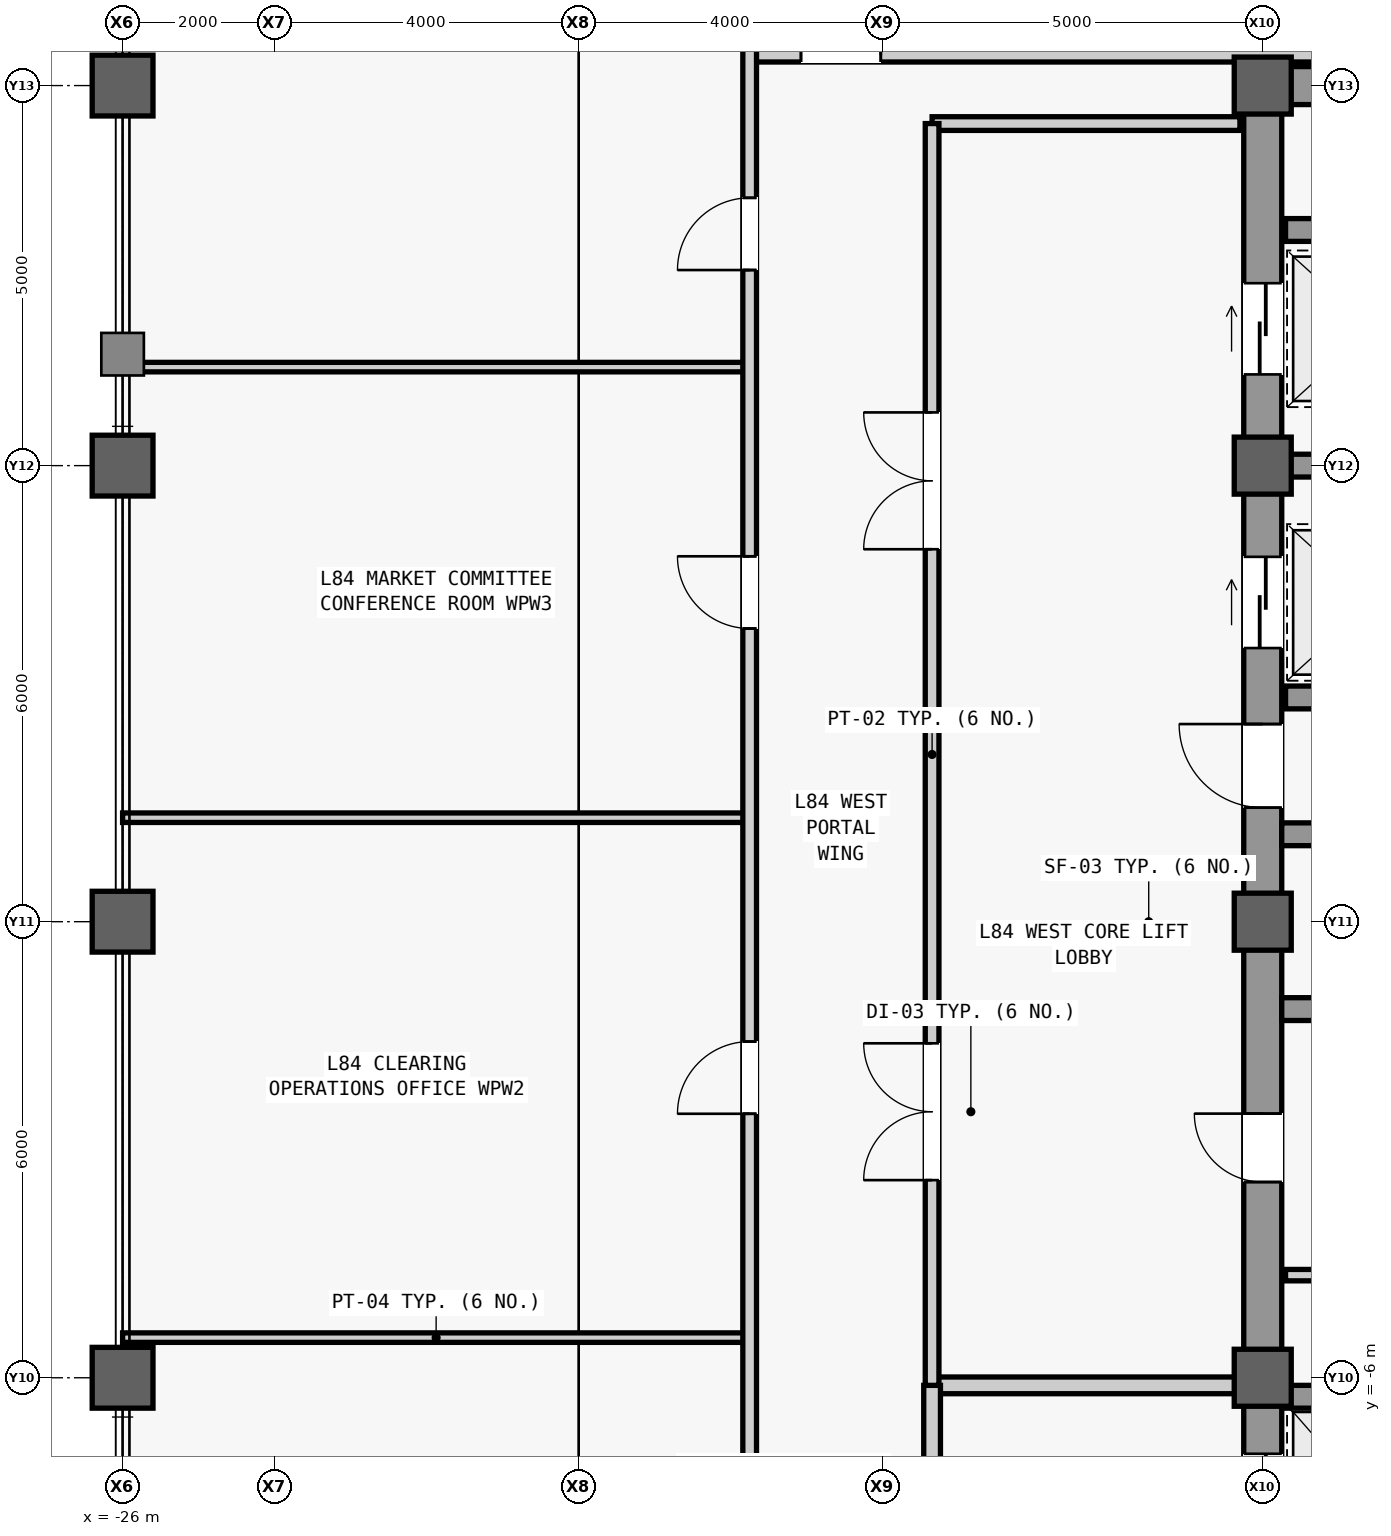
"""IFC4 building model, lengths in metres.
Left out: names, types, materials, properties, quantities, classifications, styles, units other than length and angle.
Written with IfcOpenShell. Run it as: python <this file> out.ifc"""

import sys

from ifc_helpers import new_model, si_unit, direction, frame, frame_2d, origin, origin_2d, place, context, subcontext, project, spatial, rectangle, hollow_rectangle, extrude, source, transform, mapped, element, fill, save


model = new_model("IFC4")
c1 = context("Model", 3, precision=1e-05, world=origin(), true_north=direction((0.0, 1.0)))
c2 = subcontext(c1, "Body", "Model", "MODEL_VIEW")
j1 = project(units=[si_unit("LENGTHUNIT", "METRE"), si_unit("PLANEANGLEUNIT", "RADIAN")], contexts=[c1])
p1 = place(None, origin())
s1 = spatial("IfcSite", under=j1, at=p1, CompositionType="ELEMENT")
p2 = place(p1, origin())
s2 = spatial("IfcBuilding", under=s1, at=p2, CompositionType="ELEMENT")
p3 = place(p2, frame((0.0, 0.0, 354.3)))
s3 = spatial("IfcBuildingStorey", under=s2, at=p3, CompositionType="ELEMENT", Elevation=354.3)
m1 = source(origin(), c2, "Body", "SweptSolid", [
    extrude(rectangle(XDim=22.0, YDim=0.5, at=frame_2d((11.0, 0.0))), origin(), (0.0, 0.0, 1.0), 3.74),
])
p4 = place(p3, frame((-11.0, -11.0, 0.0), z_axis=(0.0, 0.0, 1.0), x_axis=(0.0, 1.0, 0.0)))
e1 = element("IfcWall", 1, at=p4, inside=s3, PredefinedType="SHEAR", context=c2, shape_type="MappedRepresentation", body=[
    mapped(m1, transform((0.0, 0.0, 0.0), scale=1.0)),
])
m2 = source(origin(), c2, "Body", "SweptSolid", [
    extrude(rectangle(XDim=1.1, YDim=2.2, at=frame_2d((0.55, 1.1))), frame((0.0, 0.26, 0.0), z_axis=(0.0, -1.0, 0.0), x_axis=(1.0, 0.0, 0.0)), (0.0, 0.0, 1.0), 0.52),
])
p5 = place(p4, frame((0.8, 0.0, 0.0)))
e2 = element("IfcOpeningElement", 2, at=p5, cuts=e1, PredefinedType="OPENING", context=c2, shape_type="MappedRepresentation", body=[
    mapped(m2, transform((0.0, 0.0, 0.0), scale=1.0)),
])
p6 = place(p4, frame((12.5, 0.0, 0.0)))
e3 = element("IfcOpeningElement", 3, at=p6, cuts=e1, PredefinedType="OPENING", context=c2, shape_type="MappedRepresentation", body=[
    mapped(m2, transform((0.0, 0.0, 0.0), scale=1.0)),
])
m3 = source(origin(), c2, "Body", "SweptSolid", [
    extrude(rectangle(XDim=0.9, YDim=2.15, at=frame_2d((0.45, 1.075))), frame((0.0, 0.26, 0.0), z_axis=(0.0, -1.0, 0.0), x_axis=(1.0, 0.0, 0.0)), (0.0, 0.0, 1.0), 0.52),
])
p7 = place(p4, frame((7.575, 0.0, 0.0)))
e4 = element("IfcOpeningElement", 4, at=p7, cuts=e1, PredefinedType="OPENING", context=c2, shape_type="MappedRepresentation", body=[
    mapped(m3, transform((0.0, 0.0, 0.0), scale=1.0)),
])
m4 = source(origin(), c2, "Body", "SweptSolid", [
    extrude(rectangle(XDim=1.2, YDim=2.3, at=frame_2d((0.6, 1.15))), frame((0.0, 0.26, 0.0), z_axis=(0.0, -1.0, 0.0), x_axis=(1.0, 0.0, 0.0)), (0.0, 0.0, 1.0), 0.52),
])
p8 = place(p4, frame((14.6, 0.0, 0.0)))
e5 = element("IfcOpeningElement", 5, at=p8, cuts=e1, PredefinedType="OPENING", context=c2, shape_type="MappedRepresentation", body=[
    mapped(m4, transform((0.0, 0.0, 0.0), scale=1.0)),
])
p9 = place(p4, frame((18.2, 0.0, 0.0)))
e6 = element("IfcOpeningElement", 6, at=p9, cuts=e1, PredefinedType="OPENING", context=c2, shape_type="MappedRepresentation", body=[
    mapped(m4, transform((0.0, 0.0, 0.0), scale=1.0)),
])
m5 = source(origin(), c2, "Body", "SweptSolid", [
    extrude(rectangle(XDim=1.3, YDim=2.3, at=frame_2d((0.65, 1.15))), frame((0.0, 0.26, 0.0), z_axis=(0.0, -1.0, 0.0), x_axis=(1.0, 0.0, 0.0)), (0.0, 0.0, 1.0), 0.52),
])
p10 = place(p4, frame((2.7, 0.0, 0.0)))
e7 = element("IfcOpeningElement", 7, at=p10, cuts=e1, PredefinedType="OPENING", context=c2, shape_type="MappedRepresentation", body=[
    mapped(m5, transform((0.0, 0.0, 0.0), scale=1.0)),
])
m6 = source(origin(), c2, "Body", "SweptSolid", [
    extrude(rectangle(XDim=5.9, YDim=0.5, at=frame_2d((2.95, 0.0))), origin(), (0.0, 0.0, 1.0), 3.74),
])
p11 = place(p3, frame((-10.75, 11.0, 0.0), z_axis=(0.0, 0.0, 1.0), x_axis=(1.0, 0.0, 0.0)))
e8 = element("IfcWall", 8, at=p11, inside=s3, PredefinedType="SHEAR", context=c2, shape_type="MappedRepresentation", body=[
    mapped(m6, transform((0.0, 0.0, 0.0), scale=1.0)),
])
m7 = source(origin(), c2, "Body", "SweptSolid", [
    extrude(rectangle(XDim=5.65, YDim=0.3, at=frame_2d((2.825, 0.0))), origin(), (0.0, 0.0, 1.0), 3.74),
])
for number, where, z_axis, x_axis in (
    (9, (-10.75, -1.15, 0.0), (0.0, 0.0, 1.0), (1.0, 0.0, 0.0)),
    (10, (-10.75, 1.15, 0.0), (0.0, 0.0, 1.0), (1.0, 0.0, 0.0)),
):
    element("IfcWall", number, at=place(p3, frame(where, z_axis=z_axis, x_axis=x_axis)), inside=s3, PredefinedType="SHEAR", context=c2, shape_type="MappedRepresentation", body=[
        mapped(m7, transform((0.0, 0.0, 0.0), scale=1.0)),
    ])
m8 = source(origin(), c2, "Body", "SweptSolid", [
    extrude(hollow_rectangle(XDim=0.8, YDim=0.8, WallThickness=0.045, at=origin_2d()), origin(), (0.0, 0.0, 1.0), 4.0),
])
for number, where, z_axis, x_axis in (
    (11, (-26.0, -6.0, 0.0), (0.0, 0.0, 1.0), (1.0, 0.0, 0.0)),
    (12, (-26.0, 0.0, 0.0), (0.0, 0.0, 1.0), (1.0, 0.0, 0.0)),
    (13, (-26.0, 6.0, 0.0), (0.0, 0.0, 1.0), (1.0, 0.0, 0.0)),
    (14, (-26.0, 11.0, 0.0), (0.0, 0.0, 1.0), (1.0, 0.0, 0.0)),
):
    element("IfcColumn", number, at=place(p3, frame(where, z_axis=z_axis, x_axis=x_axis)), inside=s3, PredefinedType="COLUMN", context=c2, shape_type="MappedRepresentation", body=[
        mapped(m8, transform((0.0, 0.0, 0.0), scale=1.0)),
    ])
m9 = source(origin(), c2, "Body", "SweptSolid", [
    extrude(rectangle(XDim=0.75, YDim=0.75, at=origin_2d()), origin(), (0.0, 0.0, 1.0), 4.0),
])
for number, where, z_axis, x_axis in (
    (15, (-11.0, -6.0, 0.0), (0.0, 0.0, 1.0), (1.0, 0.0, 0.0)),
    (16, (-11.0, 0.0, 0.0), (0.0, 0.0, 1.0), (1.0, 0.0, 0.0)),
    (17, (-11.0, 6.0, 0.0), (0.0, 0.0, 1.0), (1.0, 0.0, 0.0)),
    (18, (-11.0, 11.0, 0.0), (0.0, 0.0, 1.0), (1.0, 0.0, 0.0)),
):
    element("IfcColumn", number, at=place(p3, frame(where, z_axis=z_axis, x_axis=x_axis)), inside=s3, PredefinedType="COLUMN", context=c2, shape_type="MappedRepresentation", body=[
        mapped(m9, transform((0.0, 0.0, 0.0), scale=1.0)),
    ])
m10 = source(origin(), c2, "Body", "SweptSolid", [
    extrude(rectangle(XDim=2.2, YDim=0.3, at=frame_2d((1.1, 0.0))), origin(), (0.0, 0.0, 1.0), 3.74),
])
for number, where, z_axis, x_axis in (
    (19, (-10.7, -6.25, 0.0), (0.0, 0.0, 1.0), (1.0, 0.0, 0.0)),
    (20, (-10.7, 2.95, 0.0), (0.0, 0.0, 1.0), (1.0, 0.0, 0.0)),
    (21, (-10.7, 6.0, 0.0), (0.0, 0.0, 1.0), (1.0, 0.0, 0.0)),
    (22, (-10.7, 9.1, 0.0), (0.0, 0.0, 1.0), (1.0, 0.0, 0.0)),
):
    element("IfcWall", number, at=place(p3, frame(where, z_axis=z_axis, x_axis=x_axis)), inside=s3, PredefinedType="SHEAR", context=c2, shape_type="MappedRepresentation", body=[
        mapped(m10, transform((0.0, 0.0, 0.0), scale=1.0)),
    ])
m11 = source(origin(), c2, "Body", "SweptSolid", [
    extrude(rectangle(XDim=2.05, YDim=0.15, at=frame_2d((1.025, 0.0))), origin(), (0.0, 0.0, 1.0), 3.74),
])
p12 = place(p3, frame((-10.7, -4.65, 0.0), z_axis=(0.0, 0.0, 1.0), x_axis=(1.0, 0.0, 0.0)))
e23 = element("IfcWall", 23, at=p12, inside=s3, PredefinedType="PARTITIONING", context=c2, shape_type="MappedRepresentation", body=[
    mapped(m11, transform((0.0, 0.0, 0.0), scale=1.0)),
])
m12 = source(origin(), c2, "Body", "SweptSolid", [
    extrude(rectangle(XDim=4.05, YDim=0.22, at=frame_2d((2.025, 0.0))), origin(), (0.0, 0.0, 1.0), 3.124),
])
p13 = place(p3, frame((-15.35, -6.1, 0.0), z_axis=(0.0, 0.0, 1.0), x_axis=(1.0, 0.0, 0.0)))
e24 = element("IfcWall", 24, at=p13, inside=s3, PredefinedType="PARTITIONING", context=c2, shape_type="MappedRepresentation", body=[
    mapped(m12, transform((0.0, 0.0, 0.0), scale=1.0)),
])
m13 = source(origin(), c2, "Body", "SweptSolid", [
    extrude(rectangle(XDim=4.4, YDim=0.22, at=frame_2d((2.2, 0.0))), origin(), (0.0, 0.0, 1.0), 3.74),
])
p14 = place(p3, frame((-15.35, -10.5, 0.0), z_axis=(0.0, 0.0, 1.0), x_axis=(0.0, 1.0, 0.0)))
e25 = element("IfcWall", 25, at=p14, inside=s3, PredefinedType="PARTITIONING", context=c2, shape_type="MappedRepresentation", body=[
    mapped(m13, transform((0.0, 0.0, 0.0), scale=1.0)),
])
m14 = source(origin(), c2, "Body", "SweptSolid", [
    extrude(rectangle(XDim=1.2, YDim=2.2, at=frame_2d((0.6, 1.1))), frame((0.0, 0.12, 0.0), z_axis=(0.0, -1.0, 0.0), x_axis=(1.0, 0.0, 0.0)), (0.0, 0.0, 1.0), 0.24),
])
p15 = place(p14, frame((1.6, 0.0, 0.0)))
e26 = element("IfcOpeningElement", 26, at=p15, cuts=e25, PredefinedType="OPENING", context=c2, shape_type="MappedRepresentation", body=[
    mapped(m14, transform((0.0, 0.0, 0.0), scale=1.0)),
])
m15 = source(origin(), c2, "Body", "SweptSolid", [
    extrude(rectangle(XDim=4.05, YDim=0.18, at=frame_2d((2.025, 0.0))), origin(), (0.0, 0.0, 1.0), 3.74),
])
p16 = place(p3, frame((-15.35, 10.5, 0.0), z_axis=(0.0, 0.0, 1.0), x_axis=(1.0, 0.0, 0.0)))
e27 = element("IfcWall", 27, at=p16, inside=s3, PredefinedType="PARTITIONING", context=c2, shape_type="MappedRepresentation", body=[
    mapped(m15, transform((0.0, 0.0, 0.0), scale=1.0)),
])
m16 = source(origin(), c2, "Body", "SweptSolid", [
    extrude(rectangle(XDim=16.6, YDim=0.18, at=frame_2d((8.3, 0.0))), origin(), (0.0, 0.0, 1.0), 3.74),
])
p17 = place(p3, frame((-15.35, -6.1, 0.0), z_axis=(0.0, 0.0, 1.0), x_axis=(0.0, 1.0, 0.0)))
e28 = element("IfcWall", 28, at=p17, inside=s3, PredefinedType="PARTITIONING", context=c2, shape_type="MappedRepresentation", body=[
    mapped(m16, transform((0.0, 0.0, 0.0), scale=1.0)),
])
m17 = source(origin(), c2, "Body", "SweptSolid", [
    extrude(rectangle(XDim=1.8, YDim=2.25, at=frame_2d((0.9, 1.125))), frame((0.0, 0.1, 0.0), z_axis=(0.0, -1.0, 0.0), x_axis=(1.0, 0.0, 0.0)), (0.0, 0.0, 1.0), 0.2),
])
p18 = place(p17, frame((2.7, 0.0, 0.0)))
e29 = element("IfcOpeningElement", 29, at=p18, cuts=e28, PredefinedType="OPENING", context=c2, shape_type="MappedRepresentation", body=[
    mapped(m17, transform((0.0, 0.0, 0.0), scale=1.0)),
])
p19 = place(p17, frame((11.0, 0.0, 0.0)))
e30 = element("IfcOpeningElement", 30, at=p19, cuts=e28, PredefinedType="OPENING", context=c2, shape_type="MappedRepresentation", body=[
    mapped(m17, transform((0.0, 0.0, 0.0), scale=1.0)),
])
m18 = source(origin(), c2, "Body", "SweptSolid", [
    extrude(rectangle(XDim=12.7, YDim=0.18, at=frame_2d((6.35, 0.0))), origin(), (0.0, 0.0, 1.0), 2.79),
])
p20 = place(p3, frame((-17.75, 11.4, 0.0), z_axis=(0.0, 0.0, 1.0), x_axis=(1.0, 0.0, 0.0)))
e31 = element("IfcWall", 31, at=p20, inside=s3, PredefinedType="PARTITIONING", context=c2, shape_type="MappedRepresentation", body=[
    mapped(m18, transform((0.0, 0.0, 0.0), scale=1.0)),
])
m19 = source(origin(), c2, "Body", "SweptSolid", [
    extrude(rectangle(XDim=1.05, YDim=2.2, at=frame_2d((0.525, 1.1))), frame((0.0, 0.1, 0.0), z_axis=(0.0, -1.0, 0.0), x_axis=(1.0, 0.0, 0.0)), (0.0, 0.0, 1.0), 0.2),
])
p21 = place(p20, frame((0.675, 0.0, 0.0)))
e32 = element("IfcOpeningElement", 32, at=p21, cuts=e31, PredefinedType="OPENING", context=c2, shape_type="MappedRepresentation", body=[
    mapped(m19, transform((0.0, 0.0, 0.0), scale=1.0)),
])
m20 = source(origin(), c2, "Body", "SweptSolid", [
    extrude(rectangle(XDim=8.25, YDim=0.125, at=frame_2d((4.125, 0.0))), origin(), (0.0, 0.0, 1.0), 3.74),
])
for number, where, z_axis, x_axis in (
    (33, (-26.0, -5.472, 0.0), (0.0, 0.0, 1.0), (1.0, 0.0, 0.0)),
    (34, (-26.0, 1.368, 0.0), (0.0, 0.0, 1.0), (1.0, 0.0, 0.0)),
    (35, (-26.0, 7.296, 0.0), (0.0, 0.0, 1.0), (1.0, 0.0, 0.0)),
):
    element("IfcWall", number, at=place(p3, frame(where, z_axis=z_axis, x_axis=x_axis)), inside=s3, PredefinedType="PARTITIONING", context=c2, shape_type="MappedRepresentation", body=[
        mapped(m20, transform((0.0, 0.0, 0.0), scale=1.0)),
    ])
m21 = source(origin(), c2, "Body", "SweptSolid", [
    extrude(rectangle(XDim=40.0, YDim=0.18, at=frame_2d((20.0, 0.0))), origin(), (0.0, 0.0, 1.0), 3.74),
])
p22 = place(p3, frame((-17.75, -20.0, 0.0), z_axis=(0.0, 0.0, 1.0), x_axis=(0.0, 1.0, 0.0)))
e36 = element("IfcWall", 36, at=p22, inside=s3, PredefinedType="PARTITIONING", context=c2, shape_type="MappedRepresentation", body=[
    mapped(m21, transform((0.0, 0.0, 0.0), scale=1.0)),
])
m22 = source(origin(), c2, "Body", "SweptSolid", [
    extrude(rectangle(XDim=0.95, YDim=2.15, at=frame_2d((0.475, 1.075))), frame((0.0, 0.1, 0.0), z_axis=(0.0, -1.0, 0.0), x_axis=(1.0, 0.0, 0.0)), (0.0, 0.0, 1.0), 0.2),
])
p23 = place(p22, frame((11.389, 0.0, 0.0)))
e37 = element("IfcOpeningElement", 37, at=p23, cuts=e36, PredefinedType="OPENING", context=c2, shape_type="MappedRepresentation", body=[
    mapped(m22, transform((0.0, 0.0, 0.0), scale=1.0)),
])
p24 = place(p22, frame((17.473, 0.0, 0.0)))
e38 = element("IfcOpeningElement", 38, at=p24, cuts=e36, PredefinedType="OPENING", context=c2, shape_type="MappedRepresentation", body=[
    mapped(m22, transform((0.0, 0.0, 0.0), scale=1.0)),
])
p25 = place(p22, frame((23.857, 0.0, 0.0)))
e39 = element("IfcOpeningElement", 39, at=p25, cuts=e36, PredefinedType="OPENING", context=c2, shape_type="MappedRepresentation", body=[
    mapped(m22, transform((0.0, 0.0, 0.0), scale=1.0)),
])
p26 = place(p22, frame((28.573, 0.0, 0.0)))
e40 = element("IfcOpeningElement", 40, at=p26, cuts=e36, PredefinedType="OPENING", context=c2, shape_type="MappedRepresentation", body=[
    mapped(m22, transform((0.0, 0.0, 0.0), scale=1.0)),
])
m23 = source(origin(), c2, "Body", "SweptSolid", [
    extrude(rectangle(XDim=1.1, YDim=2.2, at=frame_2d((0.55, 1.1))), frame((0.0, 0.025, 0.0), z_axis=(0.0, -1.0, 0.0), x_axis=(1.0, 0.0, 0.0)), (0.0, 0.0, 1.0), 0.05),
])
p27 = place(p6, origin())
e41 = element("IfcDoor", 41, at=p27, inside=s3, OperationType="SINGLE_SWING_RIGHT", PredefinedType="DOOR", context=c2, shape_type="MappedRepresentation", body=[
    mapped(m23, transform((0.0, 0.0, 0.0), scale=1.0)),
])
fill(e3, e41)
m24 = source(origin(), c2, "Body", "SweptSolid", [
    extrude(rectangle(XDim=0.9, YDim=2.15, at=frame_2d((0.45, 1.075))), frame((0.0, 0.025, 0.0), z_axis=(0.0, -1.0, 0.0), x_axis=(1.0, 0.0, 0.0)), (0.0, 0.0, 1.0), 0.05),
])
p28 = place(p7, origin())
e42 = element("IfcDoor", 42, at=p28, inside=s3, OperationType="SINGLE_SWING_RIGHT", PredefinedType="DOOR", context=c2, shape_type="MappedRepresentation", body=[
    mapped(m24, transform((0.0, 0.0, 0.0), scale=1.0)),
])
fill(e4, e42)
m25 = source(origin(), c2, "Body", "SweptSolid", [
    extrude(rectangle(XDim=1.8, YDim=2.25, at=frame_2d((0.9, 1.125))), frame((0.0, 0.025, 0.0), z_axis=(0.0, -1.0, 0.0), x_axis=(1.0, 0.0, 0.0)), (0.0, 0.0, 1.0), 0.05),
])
p29 = place(p18, origin())
e43 = element("IfcDoor", 43, at=p29, inside=s3, OperationType="SINGLE_SWING_LEFT", PredefinedType="DOOR", context=c2, shape_type="MappedRepresentation", body=[
    mapped(m25, transform((0.0, 0.0, 0.0), scale=1.0)),
])
fill(e29, e43)
p30 = place(p19, origin())
e44 = element("IfcDoor", 44, at=p30, inside=s3, OperationType="SINGLE_SWING_RIGHT", PredefinedType="DOOR", context=c2, shape_type="MappedRepresentation", body=[
    mapped(m25, transform((0.0, 0.0, 0.0), scale=1.0)),
])
fill(e30, e44)
m26 = source(origin(), c2, "Body", "SweptSolid", [
    extrude(rectangle(XDim=1.05, YDim=2.2, at=frame_2d((0.525, 1.1))), frame((0.0, 0.025, 0.0), z_axis=(0.0, -1.0, 0.0), x_axis=(1.0, 0.0, 0.0)), (0.0, 0.0, 1.0), 0.05),
])
p31 = place(p21, origin())
e45 = element("IfcDoor", 45, at=p31, inside=s3, OperationType="SINGLE_SWING_RIGHT", PredefinedType="DOOR", context=c2, shape_type="MappedRepresentation", body=[
    mapped(m26, transform((0.0, 0.0, 0.0), scale=1.0)),
])
fill(e32, e45)
m27 = source(origin(), c2, "Body", "SweptSolid", [
    extrude(rectangle(XDim=0.95, YDim=2.15, at=frame_2d((0.475, 1.075))), frame((0.0, 0.025, 0.0), z_axis=(0.0, -1.0, 0.0), x_axis=(1.0, 0.0, 0.0)), (0.0, 0.0, 1.0), 0.05),
])
p32 = place(p24, origin())
e46 = element("IfcDoor", 46, at=p32, inside=s3, OperationType="SINGLE_SWING_LEFT", PredefinedType="DOOR", context=c2, shape_type="MappedRepresentation", body=[
    mapped(m27, transform((0.0, 0.0, 0.0), scale=1.0)),
])
fill(e38, e46)
p33 = place(p25, origin())
e47 = element("IfcDoor", 47, at=p33, inside=s3, OperationType="SINGLE_SWING_RIGHT", PredefinedType="DOOR", context=c2, shape_type="MappedRepresentation", body=[
    mapped(m27, transform((0.0, 0.0, 0.0), scale=1.0)),
])
fill(e39, e47)
p34 = place(p26, origin())
e48 = element("IfcDoor", 48, at=p34, inside=s3, OperationType="SINGLE_SWING_LEFT", PredefinedType="DOOR", context=c2, shape_type="MappedRepresentation", body=[
    mapped(m27, transform((0.0, 0.0, 0.0), scale=1.0)),
])
fill(e40, e48)
m28 = source(origin(), c2, "Body", "SweptSolid", [
    extrude(rectangle(XDim=1.2, YDim=2.3, at=frame_2d((0.6, 1.15))), frame((0.0, 0.025, 0.0), z_axis=(0.0, -1.0, 0.0), x_axis=(1.0, 0.0, 0.0)), (0.0, 0.0, 1.0), 0.05),
])
p35 = place(p8, origin())
e49 = element("IfcDoor", 49, at=p35, inside=s3, OperationType="SLIDING_TO_LEFT", PredefinedType="DOOR", context=c2, shape_type="MappedRepresentation", body=[
    mapped(m28, transform((0.0, 0.0, 0.0), scale=1.0)),
])
fill(e5, e49)
p36 = place(p9, origin())
e50 = element("IfcDoor", 50, at=p36, inside=s3, OperationType="SLIDING_TO_LEFT", PredefinedType="DOOR", context=c2, shape_type="MappedRepresentation", body=[
    mapped(m28, transform((0.0, 0.0, 0.0), scale=1.0)),
])
fill(e6, e50)
m29 = source(origin(), c2, "Body", "SweptSolid", [
    extrude(rectangle(XDim=1.3, YDim=2.3, at=frame_2d((0.65, 1.15))), frame((0.0, 0.025, 0.0), z_axis=(0.0, -1.0, 0.0), x_axis=(1.0, 0.0, 0.0)), (0.0, 0.0, 1.0), 0.05),
])
p37 = place(p10, origin())
e51 = element("IfcDoor", 51, at=p37, inside=s3, OperationType="SLIDING_TO_LEFT", PredefinedType="DOOR", context=c2, shape_type="MappedRepresentation", body=[
    mapped(m29, transform((0.0, 0.0, 0.0), scale=1.0)),
])
fill(e7, e51)
save(model, sys.argv[1])
